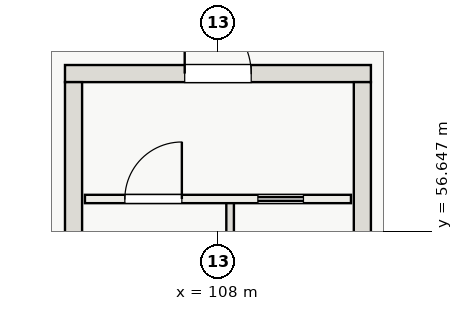
"""IFC4 building model, lengths in metres.
Left out: names, types, materials, properties, quantities, classifications, styles, units other than length and angle.
Written with IfcOpenShell. Run it as: python <this file> out.ifc"""

import sys

from ifc_helpers import new_model, si_unit, direction, frame, frame_2d, origin, place, context, subcontext, project, spatial, rectangle, extrude, element, fill, save


model = new_model("IFC4")
c1 = context("Model", 3, precision=1e-05, world=origin(), true_north=direction((0.0, 1.0)))
c2 = subcontext(c1, "Body", "Model", "MODEL_VIEW")
j1 = project(units=[si_unit("LENGTHUNIT", "METRE"), si_unit("PLANEANGLEUNIT", "RADIAN")], contexts=[c1])
p1 = place(None, origin())
s1 = spatial("IfcSite", under=j1, at=p1, CompositionType="ELEMENT")
p2 = place(p1, origin())
s2 = spatial("IfcBuilding", under=s1, at=p2, CompositionType="ELEMENT")
p3 = place(p2, frame((0.0, 0.0, -4.8)))
s3 = spatial("IfcBuildingStorey", under=s2, at=p3, CompositionType="ELEMENT", Elevation=-4.8)
p4 = place(p3, frame((103.975, 60.8, -0.45), z_axis=(0.0, 0.0, 1.0), x_axis=(1.0, 0.0, 0.0)))
e1 = element("IfcWall", 1, at=p4, inside=s3, PredefinedType="SHEAR", context=c2, shape_type="SweptSolid", body=[
    extrude(rectangle(XDim=8.05, YDim=0.45, at=frame_2d((4.025, 0.0))), origin(), (0.0, 0.0, 1.0), 5.25),
])
p5 = place(p4, frame((3.15, 0.0, 0.45)))
e2 = element("IfcOpeningElement", 2, at=p5, cuts=e1, PredefinedType="OPENING", context=c2, shape_type="SweptSolid", body=[
    extrude(rectangle(XDim=1.75, YDim=2.3, at=frame_2d((0.875, 1.15))), frame((0.0, 0.235, 0.0), z_axis=(0.0, -1.0, 0.0), x_axis=(1.0, 0.0, 0.0)), (0.0, 0.0, 1.0), 0.47),
])
for number, where, z_axis, x_axis in (
    (3, (104.2, 49.425, -0.45), (0.0, 0.0, 1.0), (0.0, 1.0, 0.0)),
    (4, (111.8, 49.425, -0.45), (0.0, 0.0, 1.0), (0.0, 1.0, 0.0)),
):
    element("IfcWall", number, at=place(p3, frame(where, z_axis=z_axis, x_axis=x_axis)), inside=s3, PredefinedType="SHEAR", context=c2, shape_type="SweptSolid", body=[
        extrude(rectangle(XDim=11.15, YDim=0.45, at=frame_2d((5.575, 0.0))), origin(), (0.0, 0.0, 1.0), 5.25),
    ])
p6 = place(p3, frame((108.32, 49.45, -0.45), z_axis=(0.0, 0.0, 1.0), x_axis=(0.0, 1.0, 0.0)))
e5 = element("IfcWall", 5, at=p6, inside=s3, PredefinedType="SOLIDWALL", context=c2, shape_type="SweptSolid", body=[
    extrude(rectangle(XDim=8.0, YDim=0.2, at=frame_2d((4.0, 0.0))), origin(), (0.0, 0.0, 1.0), 5.25),
])
p7 = place(p3, frame((104.5, 57.5, 0.0), z_axis=(0.0, 0.0, 1.0), x_axis=(1.0, 0.0, 0.0)))
e6 = element("IfcWall", 6, at=p7, inside=s3, PredefinedType="SOLIDWALL", context=c2, shape_type="SweptSolid", body=[
    extrude(rectangle(XDim=7.0, YDim=0.22, at=frame_2d((3.5, 0.0))), origin(), (0.0, 0.0, 1.0), 4.4),
])
p8 = place(p7, frame((1.05, 0.0, 0.0)))
e7 = element("IfcOpeningElement", 7, at=p8, cuts=e6, PredefinedType="OPENING", context=c2, shape_type="SweptSolid", body=[
    extrude(rectangle(XDim=1.5, YDim=2.2, at=frame_2d((0.75, 1.1))), frame((0.0, 0.12, 0.0), z_axis=(0.0, -1.0, 0.0), x_axis=(1.0, 0.0, 0.0)), (0.0, 0.0, 1.0), 0.24),
])
p9 = place(p7, frame((4.55, 0.0, 0.0)))
e8 = element("IfcOpeningElement", 8, at=p9, cuts=e6, PredefinedType="OPENING", context=c2, shape_type="SweptSolid", body=[
    extrude(rectangle(XDim=1.2, YDim=2.2, at=frame_2d((0.6, 1.1))), frame((0.0, 0.12, 0.0), z_axis=(0.0, -1.0, 0.0), x_axis=(1.0, 0.0, 0.0)), (0.0, 0.0, 1.0), 0.24),
])
p10 = place(p8, origin())
e9 = element("IfcDoor", 9, at=p10, inside=s3, OperationType="SINGLE_SWING_RIGHT", PredefinedType="DOOR", context=c2, shape_type="SweptSolid", body=[
    extrude(rectangle(XDim=1.5, YDim=2.2, at=frame_2d((0.75, 1.1))), frame((0.0, 0.025, 0.0), z_axis=(0.0, -1.0, 0.0), x_axis=(1.0, 0.0, 0.0)), (0.0, 0.0, 1.0), 0.05),
])
fill(e7, e9)
p11 = place(p9, origin())
e10 = element("IfcDoor", 10, at=p11, inside=s3, OperationType="SLIDING_TO_RIGHT", PredefinedType="DOOR", context=c2, shape_type="SweptSolid", body=[
    extrude(rectangle(XDim=1.2, YDim=2.2, at=frame_2d((0.6, 1.1))), frame((0.0, 0.025, 0.0), z_axis=(0.0, -1.0, 0.0), x_axis=(1.0, 0.0, 0.0)), (0.0, 0.0, 1.0), 0.05),
])
fill(e8, e10)
p12 = place(p5, origin())
e11 = element("IfcDoor", 11, at=p12, inside=s3, OperationType="DOUBLE_DOOR_SINGLE_SWING", PredefinedType="DOOR", context=c2, shape_type="SweptSolid", body=[
    extrude(rectangle(XDim=1.75, YDim=2.3, at=frame_2d((0.875, 1.15))), frame((0.0, 0.025, 0.0), z_axis=(0.0, -1.0, 0.0), x_axis=(1.0, 0.0, 0.0)), (0.0, 0.0, 1.0), 0.05),
])
fill(e2, e11)
save(model, sys.argv[1])
